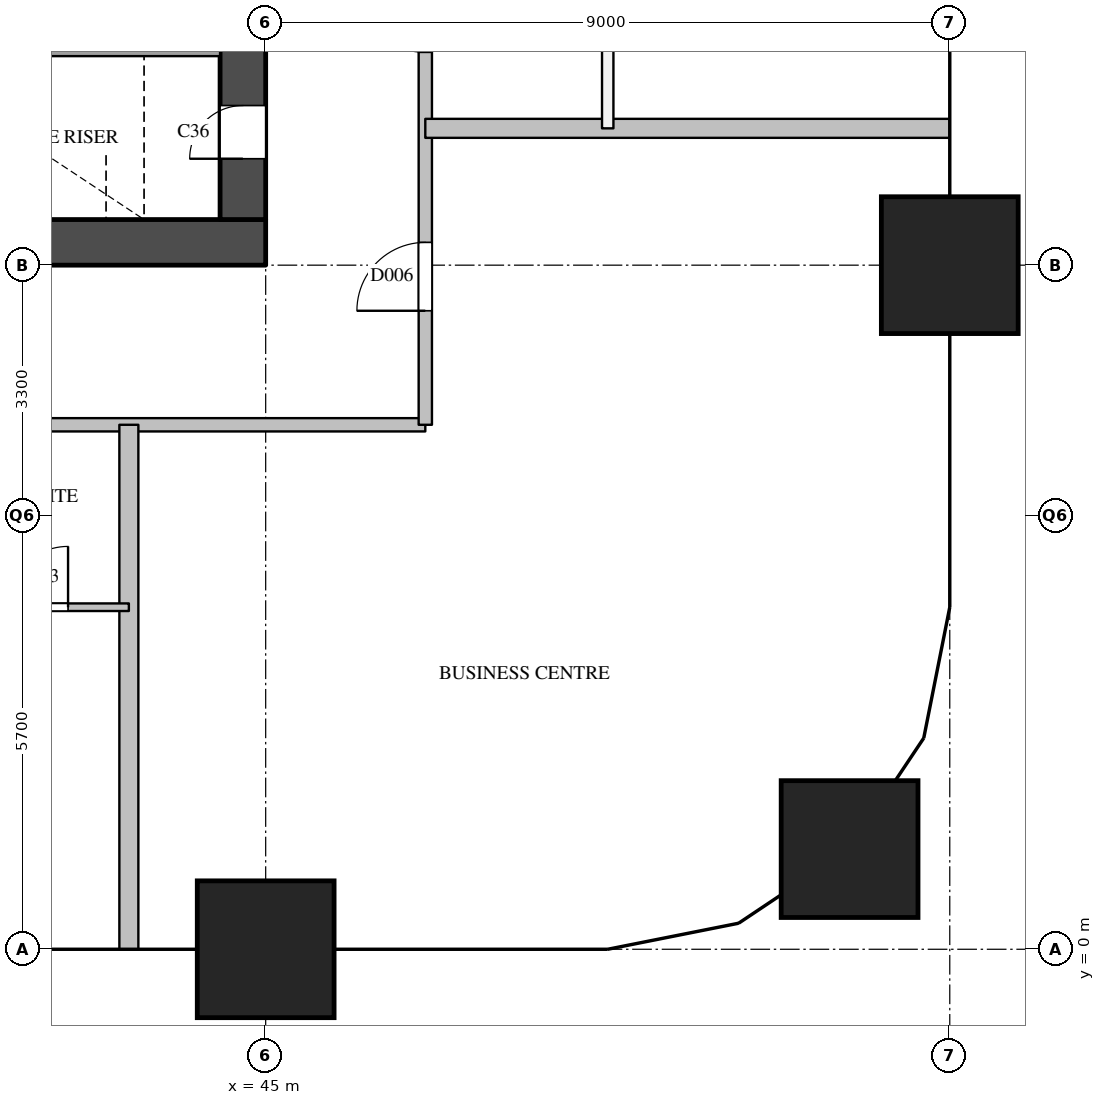
"""IFC4 building model, lengths in metres.
Left out: names, types, materials, properties, quantities, classifications, styles, units other than length and angle.
Written with IfcOpenShell. Run it as: python <this file> out.ifc"""

import sys

from ifc_helpers import new_model, si_unit, direction, frame, frame_2d, origin, origin_2d, place, context, subcontext, project, spatial, rectangle, extrude, element, fill, save


model = new_model("IFC4")
c1 = context("Model", 3, precision=1e-05, world=origin(), true_north=direction((0.0, 1.0)))
c2 = subcontext(c1, "Body", "Model", "MODEL_VIEW")
j1 = project(units=[si_unit("LENGTHUNIT", "METRE"), si_unit("PLANEANGLEUNIT", "RADIAN")], contexts=[c1])
p1 = place(None, origin())
s1 = spatial("IfcSite", under=j1, at=p1, CompositionType="ELEMENT")
p2 = place(p1, origin())
s2 = spatial("IfcBuilding", under=s1, at=p2, CompositionType="ELEMENT")
p3 = place(p2, frame((0.0, 0.0, 53.8)))
s3 = spatial("IfcBuildingStorey", under=s2, at=p3, CompositionType="ELEMENT", Elevation=53.8)
for number, where, z_axis, x_axis in (
    (1, (45.0, 0.0, 0.0), (0.0, 0.0, 1.0), (1.0, 0.0, 0.0)),
    (2, (52.682, 1.318, 0.0), (0.0, 0.0, 1.0), (1.0, 0.0, 0.0)),
    (3, (54.0, 9.0, 0.0), (0.0, 0.0, 1.0), (1.0, 0.0, 0.0)),
):
    element("IfcColumn", number, at=place(p3, frame(where, z_axis=z_axis, x_axis=x_axis)), inside=s3, PredefinedType="COLUMN", context=c2, shape_type="SweptSolid", body=[
        extrude(rectangle(XDim=1.8, YDim=1.8, at=origin_2d()), origin(), (0.0, 0.0, 1.0), 3.8),
    ])
p4 = place(p3, frame((36.0, 9.3, 0.0), z_axis=(0.0, 0.0, 1.0), x_axis=(1.0, 0.0, 0.0)))
e4 = element("IfcWall", 4, at=p4, inside=s3, PredefinedType="SHEAR", context=c2, shape_type="SweptSolid", body=[
    extrude(rectangle(XDim=9.0, YDim=0.6, at=frame_2d((4.5, 0.0))), origin(), (0.0, 0.0, 1.0), 3.5),
])
p5 = place(p3, frame((44.7, 9.6, 0.0), z_axis=(0.0, 0.0, 1.0), x_axis=(0.0, 1.0, 0.0)))
e5 = element("IfcWall", 5, at=p5, inside=s3, PredefinedType="SHEAR", context=c2, shape_type="SweptSolid", body=[
    extrude(rectangle(XDim=12.3, YDim=0.6, at=frame_2d((6.15, 0.0))), origin(), (0.0, 0.0, 1.0), 3.5),
])
p6 = place(p5, frame((0.8, 0.0, 0.0)))
e6 = element("IfcOpeningElement", 6, at=p6, cuts=e5, PredefinedType="OPENING", context=c2, shape_type="SweptSolid", body=[
    extrude(rectangle(XDim=0.7, YDim=2.1, at=frame_2d((0.35, 1.05))), frame((0.0, 0.31, 0.0), z_axis=(0.0, -1.0, 0.0), x_axis=(1.0, 0.0, 0.0)), (0.0, 0.0, 1.0), 0.62),
])
p7 = place(p3, frame((36.6, 11.85, 0.0), z_axis=(0.0, 0.0, 1.0), x_axis=(1.0, 0.0, 0.0)))
e7 = element("IfcWall", 7, at=p7, inside=s3, PredefinedType="SOLIDWALL", context=c2, shape_type="SweptSolid", body=[
    extrude(rectangle(XDim=7.8, YDim=0.2, at=frame_2d((3.9, 0.0))), origin(), (0.0, 0.0, 1.0), 3.5),
])
p8 = place(p3, frame((33.9, 6.9, 0.0), z_axis=(0.0, 0.0, 1.0), x_axis=(1.0, 0.0, 0.0)))
e8 = element("IfcWall", 8, at=p8, inside=s3, PredefinedType="PARTITIONING", context=c2, shape_type="SweptSolid", body=[
    extrude(rectangle(XDim=13.2, YDim=0.175, at=frame_2d((6.6, 0.0))), origin(), (0.0, 0.0, 1.0), 3.5),
])
p9 = place(p8, frame((4.9, 0.0, 0.0)))
e9 = element("IfcOpeningElement", 9, at=p9, cuts=e8, PredefinedType="OPENING", context=c2, shape_type="SweptSolid", body=[
    extrude(rectangle(XDim=1.0, YDim=2.1, at=frame_2d((0.5, 1.05))), frame((0.0, 0.097, 0.0), z_axis=(0.0, -1.0, 0.0), x_axis=(1.0, 0.0, 0.0)), (0.0, 0.0, 1.0), 0.195),
])
p10 = place(p8, frame((1.5, 0.0, 0.0)))
e10 = element("IfcOpeningElement", 10, at=p10, cuts=e8, PredefinedType="OPENING", context=c2, shape_type="SweptSolid", body=[
    extrude(rectangle(XDim=0.9, YDim=2.1, at=frame_2d((0.45, 1.05))), frame((0.0, 0.097, 0.0), z_axis=(0.0, -1.0, 0.0), x_axis=(1.0, 0.0, 0.0)), (0.0, 0.0, 1.0), 0.195),
])
p11 = place(p3, frame((47.1, 6.9, 0.0), z_axis=(0.0, 0.0, 1.0), x_axis=(0.0, 1.0, 0.0)))
e11 = element("IfcWall", 11, at=p11, inside=s3, PredefinedType="PARTITIONING", context=c2, shape_type="SweptSolid", body=[
    extrude(rectangle(XDim=17.09, YDim=0.175, at=frame_2d((8.545, 0.0))), origin(), (0.0, 0.0, 1.0), 3.5),
])
p12 = place(p11, frame((1.5, 0.0, 0.0)))
e12 = element("IfcOpeningElement", 12, at=p12, cuts=e11, PredefinedType="OPENING", context=c2, shape_type="SweptSolid", body=[
    extrude(rectangle(XDim=0.9, YDim=2.1, at=frame_2d((0.45, 1.05))), frame((0.0, 0.097, 0.0), z_axis=(0.0, -1.0, 0.0), x_axis=(1.0, 0.0, 0.0)), (0.0, 0.0, 1.0), 0.195),
])
p13 = place(p11, frame((4.9, 0.0, 0.0)))
e13 = element("IfcOpeningElement", 13, at=p13, cuts=e11, PredefinedType="OPENING", context=c2, shape_type="SweptSolid", body=[
    extrude(rectangle(XDim=1.0, YDim=2.1, at=frame_2d((0.5, 1.05))), frame((0.0, 0.097, 0.0), z_axis=(0.0, -1.0, 0.0), x_axis=(1.0, 0.0, 0.0)), (0.0, 0.0, 1.0), 0.195),
])
p14 = place(p11, frame((12.695, 0.0, 0.0)))
e14 = element("IfcOpeningElement", 14, at=p14, cuts=e11, PredefinedType="OPENING", context=c2, shape_type="SweptSolid", body=[
    extrude(rectangle(XDim=1.0, YDim=2.1, at=frame_2d((0.5, 1.05))), frame((0.0, 0.097, 0.0), z_axis=(0.0, -1.0, 0.0), x_axis=(1.0, 0.0, 0.0)), (0.0, 0.0, 1.0), 0.195),
])
p15 = place(p3, frame((49.5, 10.8, 0.0), z_axis=(0.0, 0.0, 1.0), x_axis=(0.0, 1.0, 0.0)))
e15 = element("IfcWall", 15, at=p15, inside=s3, PredefinedType="PARTITIONING", context=c2, shape_type="SweptSolid", body=[
    extrude(rectangle(XDim=3.0, YDim=0.15, at=frame_2d((1.5, 0.0))), origin(), (0.0, 0.0, 1.0), 3.5),
])
p16 = place(p15, frame((1.05, 0.0, 0.0)))
e16 = element("IfcOpeningElement", 16, at=p16, cuts=e15, PredefinedType="OPENING", context=c2, shape_type="SweptSolid", body=[
    extrude(rectangle(XDim=0.9, YDim=2.1, at=frame_2d((0.45, 1.05))), frame((0.0, 0.085, 0.0), z_axis=(0.0, -1.0, 0.0), x_axis=(1.0, 0.0, 0.0)), (0.0, 0.0, 1.0), 0.17),
])
for number, where, z_axis, x_axis in (
    (17, (47.1, 10.8, 0.0), (0.0, 0.0, 1.0), (1.0, 0.0, 0.0)),
    (18, (43.2, 0.0, 0.0), (0.0, 0.0, 1.0), (0.0, 1.0, 0.0)),
):
    element("IfcWall", number, at=place(p3, frame(where, z_axis=z_axis, x_axis=x_axis)), inside=s3, PredefinedType="PARTITIONING", context=c2, shape_type="SweptSolid", body=[
        extrude(rectangle(XDim=6.9, YDim=0.25, at=frame_2d((3.45, 0.0))), origin(), (0.0, 0.0, 1.0), 2.5),
    ])
p17 = place(p3, frame((40.8, 4.5, 0.0), z_axis=(0.0, 0.0, 1.0), x_axis=(1.0, 0.0, 0.0)))
e19 = element("IfcWall", 19, at=p17, inside=s3, PredefinedType="PARTITIONING", context=c2, shape_type="SweptSolid", body=[
    extrude(rectangle(XDim=2.4, YDim=0.1, at=frame_2d((1.2, 0.0))), origin(), (0.0, 0.0, 1.0), 3.5),
])
p18 = place(p17, frame((0.8, 0.0, 0.0)))
e20 = element("IfcOpeningElement", 20, at=p18, cuts=e19, PredefinedType="OPENING", context=c2, shape_type="SweptSolid", body=[
    extrude(rectangle(XDim=0.8, YDim=2.1, at=frame_2d((0.4, 1.05))), frame((0.0, 0.06, 0.0), z_axis=(0.0, -1.0, 0.0), x_axis=(1.0, 0.0, 0.0)), (0.0, 0.0, 1.0), 0.12),
])
p19 = place(p6, origin())
e21 = element("IfcDoor", 21, at=p19, inside=s3, OperationType="SINGLE_SWING_LEFT", PredefinedType="DOOR", context=c2, shape_type="SweptSolid", body=[
    extrude(rectangle(XDim=0.7, YDim=2.1, at=frame_2d((0.35, 1.05))), frame((0.0, 0.025, 0.0), z_axis=(0.0, -1.0, 0.0), x_axis=(1.0, 0.0, 0.0)), (0.0, 0.0, 1.0), 0.05),
])
fill(e6, e21)
p20 = place(p18, origin())
e22 = element("IfcDoor", 22, at=p20, inside=s3, OperationType="SINGLE_SWING_RIGHT", PredefinedType="DOOR", context=c2, shape_type="SweptSolid", body=[
    extrude(rectangle(XDim=0.8, YDim=2.1, at=frame_2d((0.4, 1.05))), frame((0.0, 0.025, 0.0), z_axis=(0.0, -1.0, 0.0), x_axis=(1.0, 0.0, 0.0)), (0.0, 0.0, 1.0), 0.05),
])
fill(e20, e22)
p21 = place(p12, origin())
e23 = element("IfcDoor", 23, at=p21, inside=s3, OperationType="SINGLE_SWING_LEFT", PredefinedType="DOOR", context=c2, shape_type="SweptSolid", body=[
    extrude(rectangle(XDim=0.9, YDim=2.1, at=frame_2d((0.45, 1.05))), frame((0.0, 0.025, 0.0), z_axis=(0.0, -1.0, 0.0), x_axis=(1.0, 0.0, 0.0)), (0.0, 0.0, 1.0), 0.05),
])
fill(e12, e23)
p22 = place(p13, origin())
e24 = element("IfcDoor", 24, at=p22, inside=s3, OperationType="SINGLE_SWING_RIGHT", PredefinedType="DOOR", context=c2, shape_type="SweptSolid", body=[
    extrude(rectangle(XDim=1.0, YDim=2.1, at=frame_2d((0.5, 1.05))), frame((0.0, 0.025, 0.0), z_axis=(0.0, -1.0, 0.0), x_axis=(1.0, 0.0, 0.0)), (0.0, 0.0, 1.0), 0.05),
])
fill(e13, e24)
save(model, sys.argv[1])
